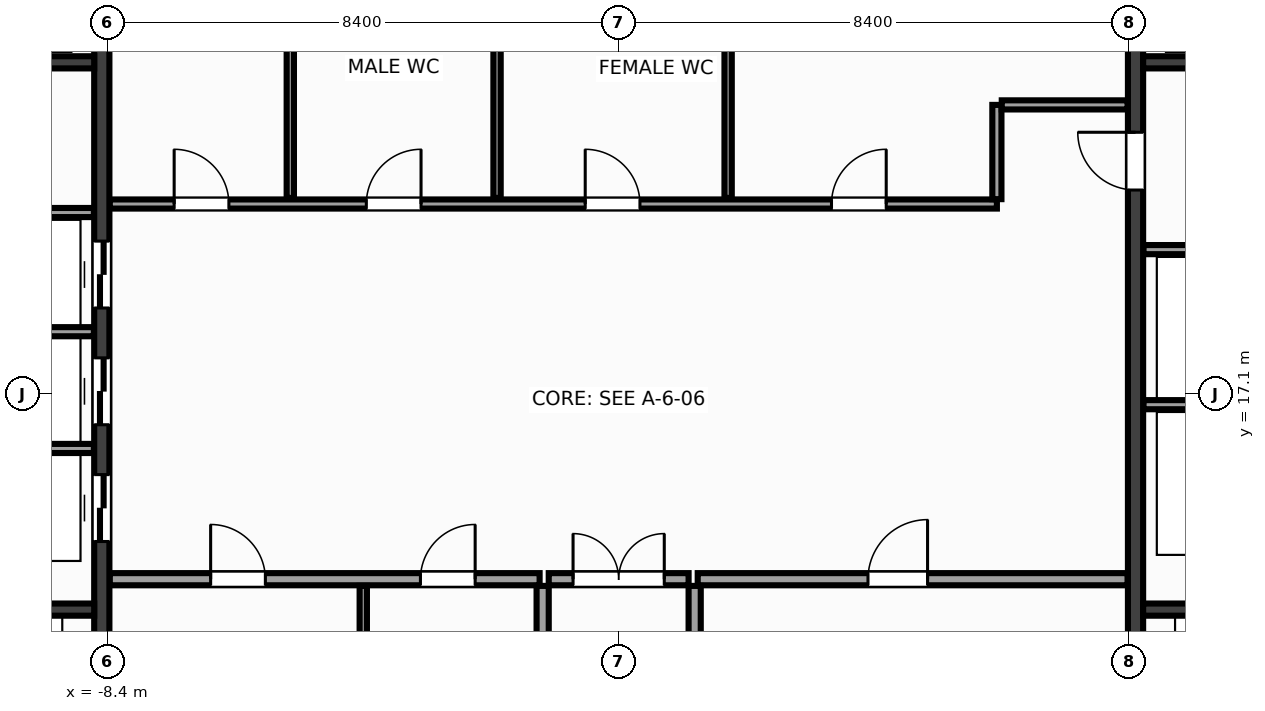
"""IFC4 building model, lengths in metres.
Left out: names, types, materials, properties, quantities, classifications, styles, units other than length and angle.
Written with IfcOpenShell. Run it as: python <this file> out.ifc"""

import sys

from ifc_helpers import new_model, si_unit, direction, frame, frame_2d, origin, place, context, subcontext, project, spatial, rectangle, extrude, source, transform, mapped, element, fill, save


model = new_model("IFC4")
c1 = context("Model", 3, precision=1e-05, world=origin(), true_north=direction((0.0, 1.0)))
c2 = subcontext(c1, "Body", "Model", "MODEL_VIEW")
j1 = project(units=[si_unit("LENGTHUNIT", "METRE"), si_unit("PLANEANGLEUNIT", "RADIAN")], contexts=[c1])
p1 = place(None, origin())
s1 = spatial("IfcSite", under=j1, at=p1, CompositionType="ELEMENT")
p2 = place(p1, origin())
s2 = spatial("IfcBuilding", under=s1, at=p2, CompositionType="ELEMENT")
p3 = place(p2, frame((0.0, 0.0, 210.8)))
s3 = spatial("IfcBuildingStorey", under=s2, at=p3, CompositionType="ELEMENT", Elevation=210.8)
m1 = source(origin(), c2, "Body", "SweptSolid", [
    extrude(rectangle(XDim=13.1, YDim=0.25, at=frame_2d((6.55, 0.0))), origin(), (0.0, 0.0, 1.0), 3.6),
])
p4 = place(p3, frame((-8.5, 10.45, 0.0), z_axis=(0.0, 0.0, 1.0), x_axis=(0.0, 1.0, 0.0)))
e1 = element("IfcWall", 1, at=p4, inside=s3, PredefinedType="SHEAR", context=c2, shape_type="MappedRepresentation", body=[
    mapped(m1, transform((0.0, 0.0, 0.0), x_axis=(1.0, 0.0, 0.0), y_axis=(0.0, 1.0, 0.0), z_axis=(0.0, 0.0, 1.0), scale=1.0)),
])
p5 = place(p4, frame((4.22, 0.0, 0.0)))
e2 = element("IfcOpeningElement", 2, at=p5, cuts=e1, PredefinedType="OPENING", context=c2, shape_type="SweptSolid", body=[
    extrude(rectangle(XDim=1.1, YDim=2.15, at=frame_2d((0.55, 1.075))), frame((0.0, 0.137, 0.0), z_axis=(0.0, -1.0, 0.0), x_axis=(1.0, 0.0, 0.0)), (0.0, 0.0, 1.0), 0.274),
])
p6 = place(p4, frame((6.14, 0.0, 0.0)))
e3 = element("IfcOpeningElement", 3, at=p6, cuts=e1, PredefinedType="OPENING", context=c2, shape_type="SweptSolid", body=[
    extrude(rectangle(XDim=1.1, YDim=2.15, at=frame_2d((0.55, 1.075))), frame((0.0, 0.137, 0.0), z_axis=(0.0, -1.0, 0.0), x_axis=(1.0, 0.0, 0.0)), (0.0, 0.0, 1.0), 0.274),
])
p7 = place(p4, frame((8.06, 0.0, 0.0)))
e4 = element("IfcOpeningElement", 4, at=p7, cuts=e1, PredefinedType="OPENING", context=c2, shape_type="SweptSolid", body=[
    extrude(rectangle(XDim=1.1, YDim=2.15, at=frame_2d((0.55, 1.075))), frame((0.0, 0.137, 0.0), z_axis=(0.0, -1.0, 0.0), x_axis=(1.0, 0.0, 0.0)), (0.0, 0.0, 1.0), 0.274),
])
p8 = place(p3, frame((8.5, 10.45, 0.0), z_axis=(0.0, 0.0, 1.0), x_axis=(0.0, 1.0, 0.0)))
e5 = element("IfcWall", 5, at=p8, inside=s3, PredefinedType="SHEAR", context=c2, shape_type="MappedRepresentation", body=[
    mapped(m1, transform((0.0, 0.0, 0.0), x_axis=(1.0, 0.0, 0.0), y_axis=(0.0, 1.0, 0.0), z_axis=(0.0, 0.0, 1.0), scale=1.0)),
])
p9 = place(p8, frame((10.0, 0.0, 0.0)))
e6 = element("IfcOpeningElement", 6, at=p9, cuts=e5, PredefinedType="OPENING", context=c2, shape_type="SweptSolid", body=[
    extrude(rectangle(XDim=0.95, YDim=2.15, at=frame_2d((0.475, 1.075))), frame((0.0, 0.137, 0.0), z_axis=(0.0, -1.0, 0.0), x_axis=(1.0, 0.0, 0.0)), (0.0, 0.0, 1.0), 0.274),
])
m2 = source(origin(), c2, "Body", "SweptSolid", [
    extrude(rectangle(XDim=2.825, YDim=0.2, at=frame_2d((1.413, 0.0))), origin(), (0.0, 0.0, 1.0), 3.6),
])
for number, where, z_axis, x_axis in (
    (7, (-11.45, 13.55, 0.0), (0.0, 0.0, 1.0), (1.0, 0.0, 0.0)),
    (8, (8.625, 13.55, 0.0), (0.0, 0.0, 1.0), (1.0, 0.0, 0.0)),
):
    element("IfcWall", number, at=place(p3, frame(where, z_axis=z_axis, x_axis=x_axis)), inside=s3, PredefinedType="SHEAR", context=c2, shape_type="MappedRepresentation", body=[
        mapped(m2, transform((0.0, 0.0, 0.0), x_axis=(1.0, 0.0, 0.0), y_axis=(0.0, 1.0, 0.0), z_axis=(0.0, 0.0, 1.0), scale=1.0)),
    ])
m3 = source(origin(), c2, "Body", "SweptSolid", [
    extrude(rectangle(XDim=3.02, YDim=0.2, at=frame_2d((1.51, 0.0))), origin(), (0.0, 0.0, 1.0), 3.6),
])
for number, where, z_axis, x_axis in (
    (9, (-11.645, 22.55, 0.0), (0.0, 0.0, 1.0), (1.0, 0.0, 0.0)),
    (10, (8.625, 22.55, 0.0), (0.0, 0.0, 1.0), (1.0, 0.0, 0.0)),
):
    element("IfcWall", number, at=place(p3, frame(where, z_axis=z_axis, x_axis=x_axis)), inside=s3, PredefinedType="SHEAR", context=c2, shape_type="MappedRepresentation", body=[
        mapped(m3, transform((0.0, 0.0, 0.0), x_axis=(1.0, 0.0, 0.0), y_axis=(0.0, 1.0, 0.0), z_axis=(0.0, 0.0, 1.0), scale=1.0)),
    ])
m4 = source(origin(), c2, "Body", "SweptSolid", [
    extrude(rectangle(XDim=3.01, YDim=0.15, at=frame_2d((1.505, 0.0))), origin(), (0.0, 0.0, 1.0), 3.38),
])
for number, where, z_axis, x_axis in (
    (11, (-11.64, 16.2, 0.0), (0.0, 0.0, 1.0), (1.0, 0.0, 0.0)),
    (12, (-11.64, 18.12, 0.0), (0.0, 0.0, 1.0), (1.0, 0.0, 0.0)),
    (13, (-11.64, 20.08, 0.0), (0.0, 0.0, 1.0), (1.0, 0.0, 0.0)),
    (14, (8.63, 16.92, 0.0), (0.0, 0.0, 1.0), (1.0, 0.0, 0.0)),
    (15, (8.63, 19.47, 0.0), (0.0, 0.0, 1.0), (1.0, 0.0, 0.0)),
):
    element("IfcWall", number, at=place(p3, frame(where, z_axis=z_axis, x_axis=x_axis)), inside=s3, PredefinedType="PARTITIONING", context=c2, shape_type="MappedRepresentation", body=[
        mapped(m4, transform((0.0, 0.0, 0.0), x_axis=(1.0, 0.0, 0.0), y_axis=(0.0, 1.0, 0.0), z_axis=(0.0, 0.0, 1.0), scale=1.0)),
    ])
m5 = source(origin(), c2, "Body", "SweptSolid", [
    extrude(rectangle(XDim=7.07, YDim=0.2, at=frame_2d((3.535, 0.0))), origin(), (0.0, 0.0, 1.0), 3.38),
])
p10 = place(p3, frame((-8.37, 14.05, 0.0), z_axis=(0.0, 0.0, 1.0), x_axis=(1.0, 0.0, 0.0)))
e16 = element("IfcWall", 16, at=p10, inside=s3, PredefinedType="PARTITIONING", context=c2, shape_type="MappedRepresentation", body=[
    mapped(m5, transform((0.0, 0.0, 0.0), x_axis=(1.0, 0.0, 0.0), y_axis=(0.0, 1.0, 0.0), z_axis=(0.0, 0.0, 1.0), scale=1.0)),
])
p11 = place(p10, frame((1.66, 0.0, 0.0)))
e17 = element("IfcOpeningElement", 17, at=p11, cuts=e16, PredefinedType="OPENING", context=c2, shape_type="SweptSolid", body=[
    extrude(rectangle(XDim=0.9, YDim=2.15, at=frame_2d((0.45, 1.075))), frame((0.0, 0.112, 0.0), z_axis=(0.0, -1.0, 0.0), x_axis=(1.0, 0.0, 0.0)), (0.0, 0.0, 1.0), 0.224),
])
p12 = place(p10, frame((5.11, 0.0, 0.0)))
e18 = element("IfcOpeningElement", 18, at=p12, cuts=e16, PredefinedType="OPENING", context=c2, shape_type="SweptSolid", body=[
    extrude(rectangle(XDim=0.9, YDim=2.15, at=frame_2d((0.45, 1.075))), frame((0.0, 0.112, 0.0), z_axis=(0.0, -1.0, 0.0), x_axis=(1.0, 0.0, 0.0)), (0.0, 0.0, 1.0), 0.224),
])
p13 = place(p3, frame((1.3, 14.05, 0.0), z_axis=(0.0, 0.0, 1.0), x_axis=(1.0, 0.0, 0.0)))
e19 = element("IfcWall", 19, at=p13, inside=s3, PredefinedType="PARTITIONING", context=c2, shape_type="MappedRepresentation", body=[
    mapped(m5, transform((0.0, 0.0, 0.0), x_axis=(1.0, 0.0, 0.0), y_axis=(0.0, 1.0, 0.0), z_axis=(0.0, 0.0, 1.0), scale=1.0)),
])
p14 = place(p13, frame((2.8, 0.0, 0.0)))
e20 = element("IfcOpeningElement", 20, at=p14, cuts=e19, PredefinedType="OPENING", context=c2, shape_type="SweptSolid", body=[
    extrude(rectangle(XDim=0.98, YDim=2.15, at=frame_2d((0.49, 1.075))), frame((0.0, 0.112, 0.0), z_axis=(0.0, -1.0, 0.0), x_axis=(1.0, 0.0, 0.0)), (0.0, 0.0, 1.0), 0.224),
])
m6 = source(origin(), c2, "Body", "SweptSolid", [
    extrude(rectangle(XDim=3.49, YDim=0.2, at=frame_2d((1.745, 0.0))), origin(), (0.0, 0.0, 1.0), 3.38),
])
for number, where, z_axis, x_axis in (
    (21, (-1.25, 10.45, 0.0), (0.0, 0.0, 1.0), (0.0, 1.0, 0.0)),
    (22, (1.25, 10.45, 0.0), (0.0, 0.0, 1.0), (0.0, 1.0, 0.0)),
):
    element("IfcWall", number, at=place(p3, frame(where, z_axis=z_axis, x_axis=x_axis)), inside=s3, PredefinedType="PARTITIONING", context=c2, shape_type="MappedRepresentation", body=[
        mapped(m6, transform((0.0, 0.0, 0.0), x_axis=(1.0, 0.0, 0.0), y_axis=(0.0, 1.0, 0.0), z_axis=(0.0, 0.0, 1.0), scale=1.0)),
    ])
m7 = source(origin(), c2, "Body", "SweptSolid", [
    extrude(rectangle(XDim=2.3, YDim=0.2, at=frame_2d((1.15, 0.0))), origin(), (0.0, 0.0, 1.0), 3.38),
])
p15 = place(p3, frame((-1.15, 14.05, 0.0), z_axis=(0.0, 0.0, 1.0), x_axis=(1.0, 0.0, 0.0)))
e23 = element("IfcWall", 23, at=p15, inside=s3, PredefinedType="PARTITIONING", context=c2, shape_type="MappedRepresentation", body=[
    mapped(m7, transform((0.0, 0.0, 0.0), x_axis=(1.0, 0.0, 0.0), y_axis=(0.0, 1.0, 0.0), z_axis=(0.0, 0.0, 1.0), scale=1.0)),
])
p16 = place(p15, frame((0.4, 0.0, 0.0)))
e24 = element("IfcOpeningElement", 24, at=p16, cuts=e23, PredefinedType="OPENING", context=c2, shape_type="SweptSolid", body=[
    extrude(rectangle(XDim=1.5, YDim=2.2, at=frame_2d((0.75, 1.1))), frame((0.0, 0.112, 0.0), z_axis=(0.0, -1.0, 0.0), x_axis=(1.0, 0.0, 0.0)), (0.0, 0.0, 1.0), 0.224),
])
m8 = source(origin(), c2, "Body", "SweptSolid", [
    extrude(rectangle(XDim=14.59, YDim=0.15, at=frame_2d((7.295, 0.0))), origin(), (0.0, 0.0, 1.0), 3.38),
])
p17 = place(p3, frame((-8.37, 20.22, 0.0), z_axis=(0.0, 0.0, 1.0), x_axis=(1.0, 0.0, 0.0)))
e25 = element("IfcWall", 25, at=p17, inside=s3, PredefinedType="PARTITIONING", context=c2, shape_type="MappedRepresentation", body=[
    mapped(m8, transform((0.0, 0.0, 0.0), x_axis=(1.0, 0.0, 0.0), y_axis=(0.0, 1.0, 0.0), z_axis=(0.0, 0.0, 1.0), scale=1.0)),
])
p18 = place(p17, frame((1.06, 0.0, 0.0)))
e26 = element("IfcOpeningElement", 26, at=p18, cuts=e25, PredefinedType="OPENING", context=c2, shape_type="SweptSolid", body=[
    extrude(rectangle(XDim=0.9, YDim=2.15, at=frame_2d((0.45, 1.075))), frame((0.0, 0.087, 0.0), z_axis=(0.0, -1.0, 0.0), x_axis=(1.0, 0.0, 0.0)), (0.0, 0.0, 1.0), 0.174),
])
p19 = place(p17, frame((4.22, 0.0, 0.0)))
e27 = element("IfcOpeningElement", 27, at=p19, cuts=e25, PredefinedType="OPENING", context=c2, shape_type="SweptSolid", body=[
    extrude(rectangle(XDim=0.9, YDim=2.15, at=frame_2d((0.45, 1.075))), frame((0.0, 0.087, 0.0), z_axis=(0.0, -1.0, 0.0), x_axis=(1.0, 0.0, 0.0)), (0.0, 0.0, 1.0), 0.174),
])
p20 = place(p17, frame((7.82, 0.0, 0.0)))
e28 = element("IfcOpeningElement", 28, at=p20, cuts=e25, PredefinedType="OPENING", context=c2, shape_type="SweptSolid", body=[
    extrude(rectangle(XDim=0.9, YDim=2.15, at=frame_2d((0.45, 1.075))), frame((0.0, 0.087, 0.0), z_axis=(0.0, -1.0, 0.0), x_axis=(1.0, 0.0, 0.0)), (0.0, 0.0, 1.0), 0.174),
])
p21 = place(p17, frame((11.87, 0.0, 0.0)))
e29 = element("IfcOpeningElement", 29, at=p21, cuts=e25, PredefinedType="OPENING", context=c2, shape_type="SweptSolid", body=[
    extrude(rectangle(XDim=0.9, YDim=2.15, at=frame_2d((0.45, 1.075))), frame((0.0, 0.087, 0.0), z_axis=(0.0, -1.0, 0.0), x_axis=(1.0, 0.0, 0.0)), (0.0, 0.0, 1.0), 0.174),
])
m9 = source(origin(), c2, "Body", "SweptSolid", [
    extrude(rectangle(XDim=1.55, YDim=0.15, at=frame_2d((0.775, 0.0))), origin(), (0.0, 0.0, 1.0), 3.38),
])
p22 = place(p3, frame((6.22, 20.3, 0.0), z_axis=(0.0, 0.0, 1.0), x_axis=(0.0, 1.0, 0.0)))
e30 = element("IfcWall", 30, at=p22, inside=s3, PredefinedType="PARTITIONING", context=c2, shape_type="MappedRepresentation", body=[
    mapped(m9, transform((0.0, 0.0, 0.0), x_axis=(1.0, 0.0, 0.0), y_axis=(0.0, 1.0, 0.0), z_axis=(0.0, 0.0, 1.0), scale=1.0)),
])
m10 = source(origin(), c2, "Body", "SweptSolid", [
    extrude(rectangle(XDim=2.07, YDim=0.15, at=frame_2d((1.035, 0.0))), origin(), (0.0, 0.0, 1.0), 3.38),
])
p23 = place(p3, frame((6.3, 21.85, 0.0), z_axis=(0.0, 0.0, 1.0), x_axis=(1.0, 0.0, 0.0)))
e31 = element("IfcWall", 31, at=p23, inside=s3, PredefinedType="PARTITIONING", context=c2, shape_type="MappedRepresentation", body=[
    mapped(m10, transform((0.0, 0.0, 0.0), x_axis=(1.0, 0.0, 0.0), y_axis=(0.0, 1.0, 0.0), z_axis=(0.0, 0.0, 1.0), scale=1.0)),
])
m11 = source(origin(), c2, "Body", "SweptSolid", [
    extrude(rectangle(XDim=3.49, YDim=0.12, at=frame_2d((1.745, 0.0))), origin(), (0.0, 0.0, 1.0), 3.38),
])
p24 = place(p3, frame((-4.2, 10.45, 0.0), z_axis=(0.0, 0.0, 1.0), x_axis=(0.0, 1.0, 0.0)))
e32 = element("IfcWall", 32, at=p24, inside=s3, PredefinedType="PARTITIONING", context=c2, shape_type="MappedRepresentation", body=[
    mapped(m11, transform((0.0, 0.0, 0.0), x_axis=(1.0, 0.0, 0.0), y_axis=(0.0, 1.0, 0.0), z_axis=(0.0, 0.0, 1.0), scale=1.0)),
])
m12 = source(origin(), c2, "Body", "SweptSolid", [
    extrude(rectangle(XDim=3.19, YDim=0.12, at=frame_2d((1.595, 0.0))), origin(), (0.0, 0.0, 1.0), 3.38),
])
for number, where, z_axis, x_axis in (
    (33, (-5.4, 20.32, 0.0), (0.0, 0.0, 1.0), (0.0, 1.0, 0.0)),
    (34, (-2.0, 20.32, 0.0), (0.0, 0.0, 1.0), (0.0, 1.0, 0.0)),
    (35, (1.8, 20.32, 0.0), (0.0, 0.0, 1.0), (0.0, 1.0, 0.0)),
):
    element("IfcWall", number, at=place(p3, frame(where, z_axis=z_axis, x_axis=x_axis)), inside=s3, PredefinedType="PARTITIONING", context=c2, shape_type="MappedRepresentation", body=[
        mapped(m12, transform((0.0, 0.0, 0.0), x_axis=(1.0, 0.0, 0.0), y_axis=(0.0, 1.0, 0.0), z_axis=(0.0, 0.0, 1.0), scale=1.0)),
    ])
m13 = source(origin(), c2, "Body", "SweptSolid", [
    extrude(rectangle(XDim=1.1, YDim=2.15, at=frame_2d((0.55, 1.075))), frame((0.0, 0.025, 0.0), z_axis=(0.0, -1.0, 0.0), x_axis=(1.0, 0.0, 0.0)), (0.0, 0.0, 1.0), 0.05),
])
p25 = place(p5, origin())
e36 = element("IfcDoor", 36, at=p25, inside=s3, OperationType="DOUBLE_DOOR_SLIDING", PredefinedType="DOOR", context=c2, shape_type="MappedRepresentation", body=[
    mapped(m13, transform((0.0, 0.0, 0.0), x_axis=(1.0, 0.0, 0.0), y_axis=(0.0, 1.0, 0.0), z_axis=(0.0, 0.0, 1.0), scale=1.0)),
])
fill(e2, e36)
p26 = place(p6, origin())
e37 = element("IfcDoor", 37, at=p26, inside=s3, OperationType="DOUBLE_DOOR_SLIDING", PredefinedType="DOOR", context=c2, shape_type="MappedRepresentation", body=[
    mapped(m13, transform((0.0, 0.0, 0.0), x_axis=(1.0, 0.0, 0.0), y_axis=(0.0, 1.0, 0.0), z_axis=(0.0, 0.0, 1.0), scale=1.0)),
])
fill(e3, e37)
p27 = place(p7, origin())
e38 = element("IfcDoor", 38, at=p27, inside=s3, OperationType="DOUBLE_DOOR_SLIDING", PredefinedType="DOOR", context=c2, shape_type="MappedRepresentation", body=[
    mapped(m13, transform((0.0, 0.0, 0.0), x_axis=(1.0, 0.0, 0.0), y_axis=(0.0, 1.0, 0.0), z_axis=(0.0, 0.0, 1.0), scale=1.0)),
])
fill(e4, e38)
m14 = source(origin(), c2, "Body", "SweptSolid", [
    extrude(rectangle(XDim=0.95, YDim=2.15, at=frame_2d((0.475, 1.075))), frame((0.0, 0.025, 0.0), z_axis=(0.0, -1.0, 0.0), x_axis=(1.0, 0.0, 0.0)), (0.0, 0.0, 1.0), 0.05),
])
p28 = place(p9, origin())
e39 = element("IfcDoor", 39, at=p28, inside=s3, OperationType="SINGLE_SWING_RIGHT", PredefinedType="DOOR", context=c2, shape_type="MappedRepresentation", body=[
    mapped(m14, transform((0.0, 0.0, 0.0), x_axis=(1.0, 0.0, 0.0), y_axis=(0.0, 1.0, 0.0), z_axis=(0.0, 0.0, 1.0), scale=1.0)),
])
fill(e6, e39)
m15 = source(origin(), c2, "Body", "SweptSolid", [
    extrude(rectangle(XDim=0.9, YDim=2.15, at=frame_2d((0.45, 1.075))), frame((0.0, 0.025, 0.0), z_axis=(0.0, -1.0, 0.0), x_axis=(1.0, 0.0, 0.0)), (0.0, 0.0, 1.0), 0.05),
])
p29 = place(p11, origin())
e40 = element("IfcDoor", 40, at=p29, inside=s3, OperationType="SINGLE_SWING_LEFT", PredefinedType="DOOR", context=c2, shape_type="MappedRepresentation", body=[
    mapped(m15, transform((0.0, 0.0, 0.0), x_axis=(1.0, 0.0, 0.0), y_axis=(0.0, 1.0, 0.0), z_axis=(0.0, 0.0, 1.0), scale=1.0)),
])
fill(e17, e40)
p30 = place(p12, origin())
e41 = element("IfcDoor", 41, at=p30, inside=s3, OperationType="SINGLE_SWING_RIGHT", PredefinedType="DOOR", context=c2, shape_type="MappedRepresentation", body=[
    mapped(m15, transform((0.0, 0.0, 0.0), x_axis=(1.0, 0.0, 0.0), y_axis=(0.0, 1.0, 0.0), z_axis=(0.0, 0.0, 1.0), scale=1.0)),
])
fill(e18, e41)
m16 = source(origin(), c2, "Body", "SweptSolid", [
    extrude(rectangle(XDim=0.98, YDim=2.15, at=frame_2d((0.49, 1.075))), frame((0.0, 0.025, 0.0), z_axis=(0.0, -1.0, 0.0), x_axis=(1.0, 0.0, 0.0)), (0.0, 0.0, 1.0), 0.05),
])
p31 = place(p14, origin())
e42 = element("IfcDoor", 42, at=p31, inside=s3, OperationType="SINGLE_SWING_RIGHT", PredefinedType="DOOR", context=c2, shape_type="MappedRepresentation", body=[
    mapped(m16, transform((0.0, 0.0, 0.0), x_axis=(1.0, 0.0, 0.0), y_axis=(0.0, 1.0, 0.0), z_axis=(0.0, 0.0, 1.0), scale=1.0)),
])
fill(e20, e42)
m17 = source(origin(), c2, "Body", "SweptSolid", [
    extrude(rectangle(XDim=1.5, YDim=2.2, at=frame_2d((0.75, 1.1))), frame((0.0, 0.025, 0.0), z_axis=(0.0, -1.0, 0.0), x_axis=(1.0, 0.0, 0.0)), (0.0, 0.0, 1.0), 0.05),
])
p32 = place(p16, origin())
e43 = element("IfcDoor", 43, at=p32, inside=s3, OperationType="DOUBLE_DOOR_SINGLE_SWING", PredefinedType="DOOR", context=c2, shape_type="MappedRepresentation", body=[
    mapped(m17, transform((0.0, 0.0, 0.0), x_axis=(1.0, 0.0, 0.0), y_axis=(0.0, 1.0, 0.0), z_axis=(0.0, 0.0, 1.0), scale=1.0)),
])
fill(e24, e43)
p33 = place(p18, origin())
e44 = element("IfcDoor", 44, at=p33, inside=s3, OperationType="SINGLE_SWING_LEFT", PredefinedType="DOOR", context=c2, shape_type="MappedRepresentation", body=[
    mapped(m15, transform((0.0, 0.0, 0.0), x_axis=(1.0, 0.0, 0.0), y_axis=(0.0, 1.0, 0.0), z_axis=(0.0, 0.0, 1.0), scale=1.0)),
])
fill(e26, e44)
p34 = place(p19, origin())
e45 = element("IfcDoor", 45, at=p34, inside=s3, OperationType="SINGLE_SWING_RIGHT", PredefinedType="DOOR", context=c2, shape_type="MappedRepresentation", body=[
    mapped(m15, transform((0.0, 0.0, 0.0), x_axis=(1.0, 0.0, 0.0), y_axis=(0.0, 1.0, 0.0), z_axis=(0.0, 0.0, 1.0), scale=1.0)),
])
fill(e27, e45)
p35 = place(p20, origin())
e46 = element("IfcDoor", 46, at=p35, inside=s3, OperationType="SINGLE_SWING_LEFT", PredefinedType="DOOR", context=c2, shape_type="MappedRepresentation", body=[
    mapped(m15, transform((0.0, 0.0, 0.0), x_axis=(1.0, 0.0, 0.0), y_axis=(0.0, 1.0, 0.0), z_axis=(0.0, 0.0, 1.0), scale=1.0)),
])
fill(e28, e46)
p36 = place(p21, origin())
e47 = element("IfcDoor", 47, at=p36, inside=s3, OperationType="SINGLE_SWING_RIGHT", PredefinedType="DOOR", context=c2, shape_type="MappedRepresentation", body=[
    mapped(m15, transform((0.0, 0.0, 0.0), x_axis=(1.0, 0.0, 0.0), y_axis=(0.0, 1.0, 0.0), z_axis=(0.0, 0.0, 1.0), scale=1.0)),
])
fill(e29, e47)
save(model, sys.argv[1])
